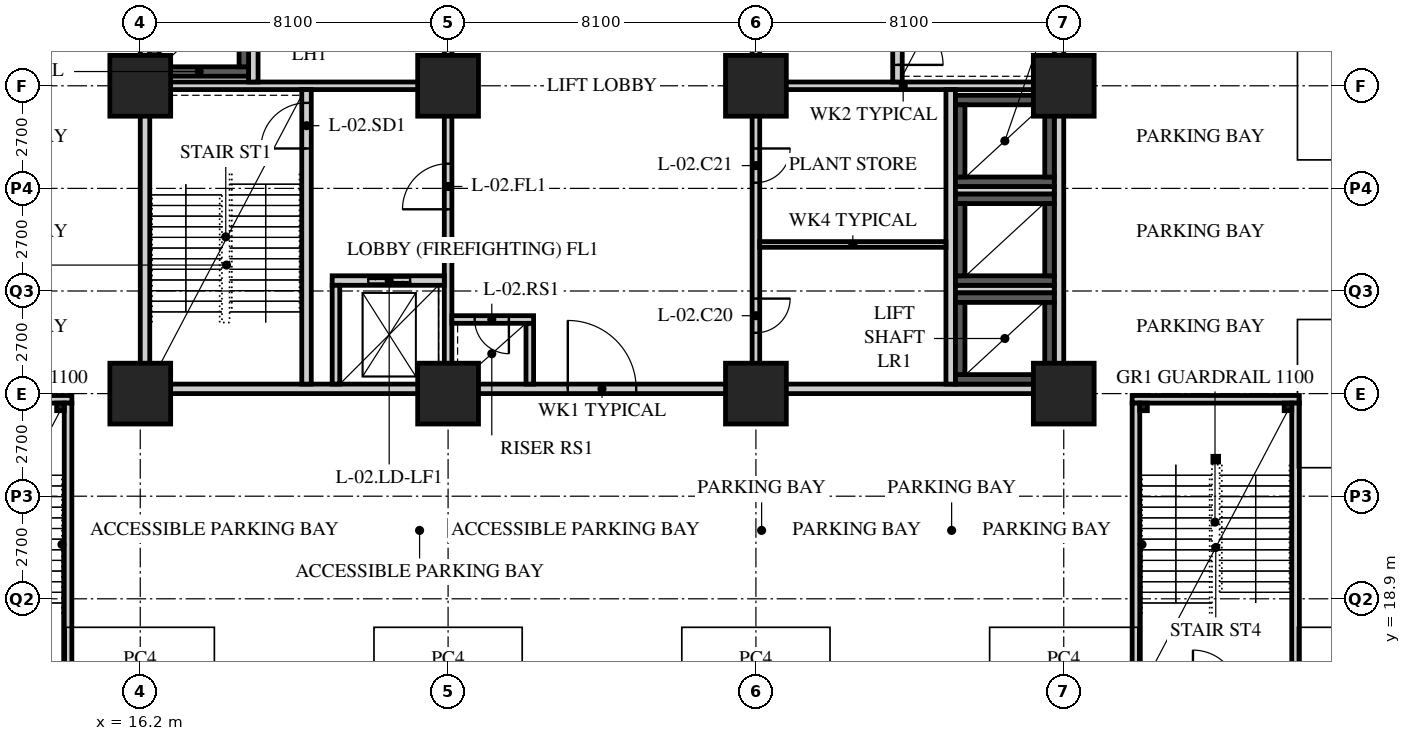
"""IFC4 building model, lengths in metres.
Left out: names, types, materials, properties, quantities, classifications, styles, units other than length and angle.
Written with IfcOpenShell. Run it as: python <this file> out.ifc"""

import sys

from ifc_helpers import new_model, si_unit, direction, frame, frame_2d, origin, origin_2d, place, context, subcontext, project, spatial, rectangle, hollow_rectangle, extrude, element, fill, save


model = new_model("IFC4")
c1 = context("Model", 3, precision=1e-05, world=origin(), true_north=direction((0.0, 1.0)))
c2 = subcontext(c1, "Body", "Model", "MODEL_VIEW")
j1 = project(units=[si_unit("LENGTHUNIT", "METRE"), si_unit("PLANEANGLEUNIT", "RADIAN")], contexts=[c1])
p1 = place(None, origin())
s1 = spatial("IfcSite", under=j1, at=p1, CompositionType="ELEMENT")
p2 = place(p1, origin())
s2 = spatial("IfcBuilding", under=s1, at=p2, CompositionType="ELEMENT")
p3 = place(p2, frame((0.0, 0.0, -8.4)))
s3 = spatial("IfcBuildingStorey", under=s2, at=p3, CompositionType="ELEMENT", Elevation=-8.4)
for number, where, z_axis, x_axis in (
    (1, (16.2, 24.3, 0.0), (0.0, 0.0, 1.0), (1.0, 0.0, 0.0)),
    (2, (16.2, 32.4, 0.0), (0.0, 0.0, 1.0), (1.0, 0.0, 0.0)),
    (3, (24.3, 24.3, 0.0), (0.0, 0.0, 1.0), (1.0, 0.0, 0.0)),
    (4, (24.3, 32.4, 0.0), (0.0, 0.0, 1.0), (1.0, 0.0, 0.0)),
    (5, (32.4, 24.3, 0.0), (0.0, 0.0, 1.0), (1.0, 0.0, 0.0)),
    (6, (32.4, 32.4, 0.0), (0.0, 0.0, 1.0), (1.0, 0.0, 0.0)),
    (7, (40.5, 24.3, 0.0), (0.0, 0.0, 1.0), (1.0, 0.0, 0.0)),
    (8, (40.5, 32.4, 0.0), (0.0, 0.0, 1.0), (1.0, 0.0, 0.0)),
):
    element("IfcColumn", number, at=place(p3, frame(where, z_axis=z_axis, x_axis=x_axis)), inside=s3, PredefinedType="COLUMN", context=c2, shape_type="SweptSolid", body=[
        extrude(hollow_rectangle(XDim=1.6, YDim=1.6, WallThickness=0.15, at=origin_2d()), origin(), (0.0, 0.0, 1.0), 4.2),
    ])
p4 = place(p3, frame((16.2, 24.425, 0.0), z_axis=(0.0, 0.0, 1.0), x_axis=(1.0, 0.0, 0.0)))
e9 = element("IfcWall", 9, at=p4, inside=s3, PredefinedType="SOLIDWALL", context=c2, shape_type="SweptSolid", body=[
    extrude(rectangle(XDim=24.3, YDim=0.25, at=frame_2d((12.15, 0.0))), origin(), (0.0, 0.0, 1.0), 2.95),
])
p5 = place(p4, frame((11.25, 0.0, 0.0)))
e10 = element("IfcOpeningElement", 10, at=p5, cuts=e9, PredefinedType="OPENING", context=c2, shape_type="SweptSolid", body=[
    extrude(rectangle(XDim=1.8, YDim=2.4, at=frame_2d((0.9, 1.2))), frame((0.0, 0.135, 0.0), z_axis=(0.0, -1.0, 0.0), x_axis=(1.0, 0.0, 0.0)), (0.0, 0.0, 1.0), 0.27),
])
for number, where, z_axis, x_axis in (
    (11, (16.325, 24.55, 0.0), (0.0, 0.0, 1.0), (0.0, 1.0, 0.0)),
    (12, (40.375, 24.55, 0.0), (0.0, 0.0, 1.0), (0.0, 1.0, 0.0)),
):
    element("IfcWall", number, at=place(p3, frame(where, z_axis=z_axis, x_axis=x_axis)), inside=s3, PredefinedType="SOLIDWALL", context=c2, shape_type="SweptSolid", body=[
        extrude(rectangle(XDim=15.7, YDim=0.25, at=frame_2d((7.85, 0.0))), origin(), (0.0, 0.0, 1.0), 2.95),
    ])
p6 = place(p3, frame((16.45, 32.4, 0.0), z_axis=(0.0, 0.0, 1.0), x_axis=(1.0, 0.0, 0.0)))
e13 = element("IfcWall", 13, at=p6, inside=s3, PredefinedType="SOLIDWALL", context=c2, shape_type="SweptSolid", body=[
    extrude(rectangle(XDim=7.95, YDim=0.2, at=frame_2d((3.975, 0.0))), origin(), (0.0, 0.0, 1.0), 2.95),
])
p7 = place(p3, frame((24.3, 24.55, 0.0), z_axis=(0.0, 0.0, 1.0), x_axis=(0.0, 1.0, 0.0)))
e14 = element("IfcWall", 14, at=p7, inside=s3, PredefinedType="SOLIDWALL", context=c2, shape_type="SweptSolid", body=[
    extrude(rectangle(XDim=7.75, YDim=0.2, at=frame_2d((3.875, 0.0))), origin(), (0.0, 0.0, 1.0), 2.95),
])
p8 = place(p7, frame((4.6, 0.0, 0.0)))
e15 = element("IfcOpeningElement", 15, at=p8, cuts=e14, PredefinedType="OPENING", context=c2, shape_type="SweptSolid", body=[
    extrude(rectangle(XDim=1.2, YDim=2.1, at=frame_2d((0.6, 1.05))), frame((0.0, 0.11, 0.0), z_axis=(0.0, -1.0, 0.0), x_axis=(1.0, 0.0, 0.0)), (0.0, 0.0, 1.0), 0.22),
])
p9 = place(p3, frame((20.575, 24.55, 0.0), z_axis=(0.0, 0.0, 1.0), x_axis=(0.0, 1.0, 0.0)))
e16 = element("IfcWall", 16, at=p9, inside=s3, PredefinedType="SOLIDWALL", context=c2, shape_type="SweptSolid", body=[
    extrude(rectangle(XDim=7.75, YDim=0.25, at=frame_2d((3.875, 0.0))), origin(), (0.0, 0.0, 1.0), 3.95),
])
p10 = place(p9, frame((6.2, 0.0, 0.0)))
e17 = element("IfcOpeningElement", 17, at=p10, cuts=e16, PredefinedType="OPENING", context=c2, shape_type="SweptSolid", body=[
    extrude(rectangle(XDim=1.2, YDim=2.1, at=frame_2d((0.6, 1.05))), frame((0.0, 0.135, 0.0), z_axis=(0.0, -1.0, 0.0), x_axis=(1.0, 0.0, 0.0)), (0.0, 0.0, 1.0), 0.27),
])
p11 = place(p3, frame((21.25, 27.275, 0.0), z_axis=(0.0, 0.0, 1.0), x_axis=(1.0, 0.0, 0.0)))
e18 = element("IfcWall", 18, at=p11, inside=s3, PredefinedType="SOLIDWALL", context=c2, shape_type="SweptSolid", body=[
    extrude(rectangle(XDim=2.95, YDim=0.25, at=frame_2d((1.475, 0.0))), origin(), (0.0, 0.0, 1.0), 3.95),
])
p12 = place(p11, frame((0.95, 0.0, 0.0)))
e19 = element("IfcOpeningElement", 19, at=p12, cuts=e18, PredefinedType="OPENING", context=c2, shape_type="SweptSolid", body=[
    extrude(rectangle(XDim=1.1, YDim=2.4, at=frame_2d((0.55, 1.2))), frame((0.0, 0.135, 0.0), z_axis=(0.0, -1.0, 0.0), x_axis=(1.0, 0.0, 0.0)), (0.0, 0.0, 1.0), 0.27),
])
p13 = place(p3, frame((21.35, 24.55, 0.0), z_axis=(0.0, 0.0, 1.0), x_axis=(0.0, 1.0, 0.0)))
e20 = element("IfcWall", 20, at=p13, inside=s3, PredefinedType="SOLIDWALL", context=c2, shape_type="SweptSolid", body=[
    extrude(rectangle(XDim=2.6, YDim=0.2, at=frame_2d((1.3, 0.0))), origin(), (0.0, 0.0, 1.0), 3.95),
])
p14 = place(p3, frame((19.175, 32.5, 0.0), z_axis=(0.0, 0.0, 1.0), x_axis=(0.0, 1.0, 0.0)))
e21 = element("IfcWall", 21, at=p14, inside=s3, PredefinedType="SOLIDWALL", context=c2, shape_type="SweptSolid", body=[
    extrude(rectangle(XDim=7.75, YDim=0.25, at=frame_2d((3.875, 0.0))), origin(), (0.0, 0.0, 1.0), 3.95),
])
p15 = place(p3, frame((26.45, 24.55, 0.0), z_axis=(0.0, 0.0, 1.0), x_axis=(0.0, 1.0, 0.0)))
e22 = element("IfcWall", 22, at=p15, inside=s3, PredefinedType="SOLIDWALL", context=c2, shape_type="SweptSolid", body=[
    extrude(rectangle(XDim=1.6, YDim=0.2, at=frame_2d((0.8, 0.0))), origin(), (0.0, 0.0, 1.0), 3.95),
])
p16 = place(p3, frame((24.4, 26.25, 0.0), z_axis=(0.0, 0.0, 1.0), x_axis=(1.0, 0.0, 0.0)))
e23 = element("IfcWall", 23, at=p16, inside=s3, PredefinedType="SOLIDWALL", context=c2, shape_type="SweptSolid", body=[
    extrude(rectangle(XDim=2.15, YDim=0.2, at=frame_2d((1.075, 0.0))), origin(), (0.0, 0.0, 1.0), 3.95),
])
p17 = place(p16, frame((0.6, 0.0, 0.0)))
e24 = element("IfcOpeningElement", 24, at=p17, cuts=e23, PredefinedType="OPENING", context=c2, shape_type="SweptSolid", body=[
    extrude(rectangle(XDim=0.9, YDim=2.1, at=frame_2d((0.45, 1.05))), frame((0.0, 0.11, 0.0), z_axis=(0.0, -1.0, 0.0), x_axis=(1.0, 0.0, 0.0)), (0.0, 0.0, 1.0), 0.22),
])
p18 = place(p3, frame((32.3, 32.4, 0.0), z_axis=(0.0, 0.0, 1.0), x_axis=(1.0, 0.0, 0.0)))
e25 = element("IfcWall", 25, at=p18, inside=s3, PredefinedType="SOLIDWALL", context=c2, shape_type="SweptSolid", body=[
    extrude(rectangle(XDim=7.95, YDim=0.2, at=frame_2d((3.975, 0.0))), origin(), (0.0, 0.0, 1.0), 2.95),
])
p19 = place(p3, frame((32.4, 32.5, 0.0), z_axis=(0.0, 0.0, 1.0), x_axis=(0.0, 1.0, 0.0)))
e26 = element("IfcWall", 26, at=p19, inside=s3, PredefinedType="SOLIDWALL", context=c2, shape_type="SweptSolid", body=[
    extrude(rectangle(XDim=7.75, YDim=0.2, at=frame_2d((3.875, 0.0))), origin(), (0.0, 0.0, 1.0), 2.95),
])
p20 = place(p19, frame((1.9, 0.0, 0.0)))
e27 = element("IfcOpeningElement", 27, at=p20, cuts=e26, PredefinedType="OPENING", context=c2, shape_type="SweptSolid", body=[
    extrude(rectangle(XDim=1.2, YDim=2.1, at=frame_2d((0.6, 1.05))), frame((0.0, 0.11, 0.0), z_axis=(0.0, -1.0, 0.0), x_axis=(1.0, 0.0, 0.0)), (0.0, 0.0, 1.0), 0.22),
])
p21 = place(p3, frame((37.525, 24.55, 0.0), z_axis=(0.0, 0.0, 1.0), x_axis=(0.0, 1.0, 0.0)))
e28 = element("IfcWall", 28, at=p21, inside=s3, PredefinedType="SOLIDWALL", context=c2, shape_type="SweptSolid", body=[
    extrude(rectangle(XDim=7.75, YDim=0.25, at=frame_2d((3.875, 0.0))), origin(), (0.0, 0.0, 1.0), 3.95),
])
for number, where, z_axis, x_axis in (
    (29, (37.65, 27.05, 0.0), (0.0, 0.0, 1.0), (1.0, 0.0, 0.0)),
    (30, (37.65, 29.65, 0.0), (0.0, 0.0, 1.0), (1.0, 0.0, 0.0)),
):
    element("IfcWall", number, at=place(p3, frame(where, z_axis=z_axis, x_axis=x_axis)), inside=s3, PredefinedType="SOLIDWALL", context=c2, shape_type="SweptSolid", body=[
        extrude(rectangle(XDim=2.6, YDim=0.2, at=frame_2d((1.3, 0.0))), origin(), (0.0, 0.0, 1.0), 3.95),
    ])
p22 = place(p3, frame((36.125, 32.5, 0.0), z_axis=(0.0, 0.0, 1.0), x_axis=(0.0, 1.0, 0.0)))
e31 = element("IfcWall", 31, at=p22, inside=s3, PredefinedType="SOLIDWALL", context=c2, shape_type="SweptSolid", body=[
    extrude(rectangle(XDim=7.75, YDim=0.25, at=frame_2d((3.875, 0.0))), origin(), (0.0, 0.0, 1.0), 3.95),
])
p23 = place(p22, frame((0.45, 0.0, 0.0)))
e32 = element("IfcOpeningElement", 32, at=p23, cuts=e31, PredefinedType="OPENING", context=c2, shape_type="SweptSolid", body=[
    extrude(rectangle(XDim=1.2, YDim=2.1, at=frame_2d((0.6, 1.05))), frame((0.0, 0.135, 0.0), z_axis=(0.0, -1.0, 0.0), x_axis=(1.0, 0.0, 0.0)), (0.0, 0.0, 1.0), 0.27),
])
p24 = place(p3, frame((24.3, 32.5, 0.0), z_axis=(0.0, 0.0, 1.0), x_axis=(0.0, 1.0, 0.0)))
e33 = element("IfcWall", 33, at=p24, inside=s3, PredefinedType="PARTITIONING", context=c2, shape_type="SweptSolid", body=[
    extrude(rectangle(XDim=7.75, YDim=0.2, at=frame_2d((3.875, 0.0))), origin(), (0.0, 0.0, 1.0), 2.95),
])
p25 = place(p24, frame((3.425, 0.0, 0.0)))
e34 = element("IfcOpeningElement", 34, at=p25, cuts=e33, PredefinedType="OPENING", context=c2, shape_type="SweptSolid", body=[
    extrude(rectangle(XDim=0.9, YDim=2.1, at=frame_2d((0.45, 1.05))), frame((0.0, 0.11, 0.0), z_axis=(0.0, -1.0, 0.0), x_axis=(1.0, 0.0, 0.0)), (0.0, 0.0, 1.0), 0.22),
])
p26 = place(p3, frame((32.4, 24.55, 0.0), z_axis=(0.0, 0.0, 1.0), x_axis=(0.0, 1.0, 0.0)))
e35 = element("IfcWall", 35, at=p26, inside=s3, PredefinedType="PARTITIONING", context=c2, shape_type="SweptSolid", body=[
    extrude(rectangle(XDim=7.75, YDim=0.2, at=frame_2d((3.875, 0.0))), origin(), (0.0, 0.0, 1.0), 2.95),
])
p27 = place(p26, frame((1.35, 0.0, 0.0)))
e36 = element("IfcOpeningElement", 36, at=p27, cuts=e35, PredefinedType="OPENING", context=c2, shape_type="SweptSolid", body=[
    extrude(rectangle(XDim=0.9, YDim=2.1, at=frame_2d((0.45, 1.05))), frame((0.0, 0.11, 0.0), z_axis=(0.0, -1.0, 0.0), x_axis=(1.0, 0.0, 0.0)), (0.0, 0.0, 1.0), 0.22),
])
p28 = place(p26, frame((5.3, 0.0, 0.0)))
e37 = element("IfcOpeningElement", 37, at=p28, cuts=e35, PredefinedType="OPENING", context=c2, shape_type="SweptSolid", body=[
    extrude(rectangle(XDim=0.9, YDim=2.1, at=frame_2d((0.45, 1.05))), frame((0.0, 0.11, 0.0), z_axis=(0.0, -1.0, 0.0), x_axis=(1.0, 0.0, 0.0)), (0.0, 0.0, 1.0), 0.22),
])
p29 = place(p3, frame((32.5, 28.225, 0.0), z_axis=(0.0, 0.0, 1.0), x_axis=(1.0, 0.0, 0.0)))
e38 = element("IfcWall", 38, at=p29, inside=s3, PredefinedType="PARTITIONING", context=c2, shape_type="SweptSolid", body=[
    extrude(rectangle(XDim=4.9, YDim=0.15, at=frame_2d((2.45, 0.0))), origin(), (0.0, 0.0, 1.0), 3.95),
])
p30 = place(p3, frame((10.0, 24.15, 0.0), z_axis=(0.0, 0.0, 1.0), x_axis=(1.0, 0.0, 0.0)))
e39 = element("IfcWall", 39, at=p30, inside=s3, PredefinedType="SOLIDWALL", context=c2, shape_type="SweptSolid", body=[
    extrude(rectangle(XDim=4.4, YDim=0.2, at=frame_2d((2.2, 0.0))), origin(), (0.0, 0.0, 1.0), 3.338),
])
p31 = place(p3, frame((14.3, 16.45, 0.0), z_axis=(0.0, 0.0, 1.0), x_axis=(0.0, 1.0, 0.0)))
e40 = element("IfcWall", 40, at=p31, inside=s3, PredefinedType="SOLIDWALL", context=c2, shape_type="SweptSolid", body=[
    extrude(rectangle(XDim=7.6, YDim=0.2, at=frame_2d((3.8, 0.0))), origin(), (0.0, 0.0, 1.0), 3.95),
])
p32 = place(p3, frame((42.3, 24.15, 0.0), z_axis=(0.0, 0.0, 1.0), x_axis=(1.0, 0.0, 0.0)))
e41 = element("IfcWall", 41, at=p32, inside=s3, PredefinedType="SOLIDWALL", context=c2, shape_type="SweptSolid", body=[
    extrude(rectangle(XDim=4.4, YDim=0.2, at=frame_2d((2.2, 0.0))), origin(), (0.0, 0.0, 1.0), 3.338),
])
for number, where, z_axis, x_axis in (
    (42, (42.4, 16.45, 0.0), (0.0, 0.0, 1.0), (0.0, 1.0, 0.0)),
    (43, (46.6, 16.45, 0.0), (0.0, 0.0, 1.0), (0.0, 1.0, 0.0)),
):
    element("IfcWall", number, at=place(p3, frame(where, z_axis=z_axis, x_axis=x_axis)), inside=s3, PredefinedType="SOLIDWALL", context=c2, shape_type="SweptSolid", body=[
        extrude(rectangle(XDim=7.6, YDim=0.2, at=frame_2d((3.8, 0.0))), origin(), (0.0, 0.0, 1.0), 3.95),
    ])
for number, where, z_axis, x_axis in (
    (44, (14.1, 23.95, 0.0), (0.0, 0.0, 1.0), (1.0, 0.0, 0.0)),
    (45, (42.6, 23.95, 0.0), (0.0, 0.0, 1.0), (1.0, 0.0, 0.0)),
    (46, (46.4, 23.95, 0.0), (0.0, 0.0, 1.0), (1.0, 0.0, 0.0)),
):
    element("IfcColumn", number, at=place(p3, frame(where, z_axis=z_axis, x_axis=x_axis)), inside=s3, PredefinedType="COLUMN", context=c2, shape_type="SweptSolid", body=[
        extrude(hollow_rectangle(XDim=0.2, YDim=0.2, WallThickness=0.012, at=origin_2d()), origin(), (0.0, 0.0, 1.0), 4.2),
    ])
p33 = place(p3, frame((44.5, 22.575, 0.0), z_axis=(0.0, 0.0, 1.0), x_axis=(1.0, 0.0, 0.0)))
e47 = element("IfcColumn", 47, at=p33, inside=s3, PredefinedType="COLUMN", context=c2, shape_type="SweptSolid", body=[
    extrude(hollow_rectangle(XDim=0.15, YDim=0.15, WallThickness=0.01, at=origin_2d()), origin(), (0.0, 0.0, 1.0), 4.2),
])
p34 = place(p3, frame((16.45, 32.775, -0.4), z_axis=(0.0, 0.0, 1.0), x_axis=(1.0, 0.0, 0.0)))
e48 = element("IfcWall", 48, at=p34, inside=s3, PredefinedType="SOLIDWALL", context=c2, shape_type="SweptSolid", body=[
    extrude(rectangle(XDim=2.6, YDim=0.25, at=frame_2d((1.3, 0.0))), origin(), (0.0, 0.0, 1.0), 4.6),
])
for number, where, z_axis, x_axis in (
    (49, (16.575, 32.9, -0.4), (0.0, 0.0, 1.0), (0.0, 1.0, 0.0)),
    (50, (18.925, 32.9, -0.4), (0.0, 0.0, 1.0), (0.0, 1.0, 0.0)),
):
    element("IfcWall", number, at=place(p3, frame(where, z_axis=z_axis, x_axis=x_axis)), inside=s3, PredefinedType="SOLIDWALL", context=c2, shape_type="SweptSolid", body=[
        extrude(rectangle(XDim=1.9, YDim=0.25, at=frame_2d((0.95, 0.0))), origin(), (0.0, 0.0, 1.0), 4.6),
    ])
for number, where, z_axis, x_axis in (
    (51, (37.65, 24.675, -0.4), (0.0, 0.0, 1.0), (1.0, 0.0, 0.0)),
    (52, (37.65, 26.825, -0.4), (0.0, 0.0, 1.0), (1.0, 0.0, 0.0)),
):
    element("IfcWall", number, at=place(p3, frame(where, z_axis=z_axis, x_axis=x_axis)), inside=s3, PredefinedType="SOLIDWALL", context=c2, shape_type="SweptSolid", body=[
        extrude(rectangle(XDim=2.6, YDim=0.25, at=frame_2d((1.3, 0.0))), origin(), (0.0, 0.0, 1.0), 4.6),
    ])
for number, where, z_axis, x_axis in (
    (53, (37.775, 24.8, -0.4), (0.0, 0.0, 1.0), (0.0, 1.0, 0.0)),
    (54, (40.125, 24.8, -0.4), (0.0, 0.0, 1.0), (0.0, 1.0, 0.0)),
):
    element("IfcWall", number, at=place(p3, frame(where, z_axis=z_axis, x_axis=x_axis)), inside=s3, PredefinedType="SOLIDWALL", context=c2, shape_type="SweptSolid", body=[
        extrude(rectangle(XDim=1.9, YDim=0.25, at=frame_2d((0.95, 0.0))), origin(), (0.0, 0.0, 1.0), 4.6),
    ])
for number, where, z_axis, x_axis in (
    (55, (37.65, 27.275, -0.4), (0.0, 0.0, 1.0), (1.0, 0.0, 0.0)),
    (56, (37.65, 29.425, -0.4), (0.0, 0.0, 1.0), (1.0, 0.0, 0.0)),
):
    element("IfcWall", number, at=place(p3, frame(where, z_axis=z_axis, x_axis=x_axis)), inside=s3, PredefinedType="SOLIDWALL", context=c2, shape_type="SweptSolid", body=[
        extrude(rectangle(XDim=2.6, YDim=0.25, at=frame_2d((1.3, 0.0))), origin(), (0.0, 0.0, 1.0), 4.6),
    ])
for number, where, z_axis, x_axis in (
    (57, (37.775, 27.4, -0.4), (0.0, 0.0, 1.0), (0.0, 1.0, 0.0)),
    (58, (40.125, 27.4, -0.4), (0.0, 0.0, 1.0), (0.0, 1.0, 0.0)),
):
    element("IfcWall", number, at=place(p3, frame(where, z_axis=z_axis, x_axis=x_axis)), inside=s3, PredefinedType="SOLIDWALL", context=c2, shape_type="SweptSolid", body=[
        extrude(rectangle(XDim=1.9, YDim=0.25, at=frame_2d((0.95, 0.0))), origin(), (0.0, 0.0, 1.0), 4.6),
    ])
for number, where, z_axis, x_axis in (
    (59, (37.65, 29.875, -0.4), (0.0, 0.0, 1.0), (1.0, 0.0, 0.0)),
    (60, (37.65, 32.025, -0.4), (0.0, 0.0, 1.0), (1.0, 0.0, 0.0)),
):
    element("IfcWall", number, at=place(p3, frame(where, z_axis=z_axis, x_axis=x_axis)), inside=s3, PredefinedType="SOLIDWALL", context=c2, shape_type="SweptSolid", body=[
        extrude(rectangle(XDim=2.6, YDim=0.25, at=frame_2d((1.3, 0.0))), origin(), (0.0, 0.0, 1.0), 4.6),
    ])
for number, where, z_axis, x_axis in (
    (61, (37.775, 30.0, -0.4), (0.0, 0.0, 1.0), (0.0, 1.0, 0.0)),
    (62, (40.125, 30.0, -0.4), (0.0, 0.0, 1.0), (0.0, 1.0, 0.0)),
):
    element("IfcWall", number, at=place(p3, frame(where, z_axis=z_axis, x_axis=x_axis)), inside=s3, PredefinedType="SOLIDWALL", context=c2, shape_type="SweptSolid", body=[
        extrude(rectangle(XDim=1.9, YDim=0.25, at=frame_2d((0.95, 0.0))), origin(), (0.0, 0.0, 1.0), 4.6),
    ])
p35 = place(p27, origin())
e63 = element("IfcDoor", 63, at=p35, inside=s3, OperationType="SINGLE_SWING_LEFT", PredefinedType="DOOR", context=c2, shape_type="SweptSolid", body=[
    extrude(rectangle(XDim=0.9, YDim=2.1, at=frame_2d((0.45, 1.05))), frame((0.0, 0.025, 0.0), z_axis=(0.0, -1.0, 0.0), x_axis=(1.0, 0.0, 0.0)), (0.0, 0.0, 1.0), 0.05),
])
fill(e36, e63)
p36 = place(p28, origin())
e64 = element("IfcDoor", 64, at=p36, inside=s3, OperationType="SINGLE_SWING_LEFT", PredefinedType="DOOR", context=c2, shape_type="SweptSolid", body=[
    extrude(rectangle(XDim=0.9, YDim=2.1, at=frame_2d((0.45, 1.05))), frame((0.0, 0.025, 0.0), z_axis=(0.0, -1.0, 0.0), x_axis=(1.0, 0.0, 0.0)), (0.0, 0.0, 1.0), 0.05),
])
fill(e37, e64)
p37 = place(p10, origin())
e65 = element("IfcDoor", 65, at=p37, inside=s3, OperationType="SINGLE_SWING_LEFT", PredefinedType="DOOR", context=c2, shape_type="SweptSolid", body=[
    extrude(rectangle(XDim=1.2, YDim=2.1, at=frame_2d((0.6, 1.05))), frame((0.0, 0.025, 0.0), z_axis=(0.0, -1.0, 0.0), x_axis=(1.0, 0.0, 0.0)), (0.0, 0.0, 1.0), 0.05),
])
fill(e17, e65)
p38 = place(p8, origin())
e66 = element("IfcDoor", 66, at=p38, inside=s3, OperationType="SINGLE_SWING_LEFT", PredefinedType="DOOR", context=c2, shape_type="SweptSolid", body=[
    extrude(rectangle(XDim=1.2, YDim=2.1, at=frame_2d((0.6, 1.05))), frame((0.0, 0.025, 0.0), z_axis=(0.0, -1.0, 0.0), x_axis=(1.0, 0.0, 0.0)), (0.0, 0.0, 1.0), 0.05),
])
fill(e15, e66)
p39 = place(p17, origin())
e67 = element("IfcDoor", 67, at=p39, inside=s3, OperationType="SINGLE_SWING_LEFT", PredefinedType="DOOR", context=c2, shape_type="SweptSolid", body=[
    extrude(rectangle(XDim=0.9, YDim=2.1, at=frame_2d((0.45, 1.05))), frame((0.0, 0.025, 0.0), z_axis=(0.0, -1.0, 0.0), x_axis=(1.0, 0.0, 0.0)), (0.0, 0.0, 1.0), 0.05),
])
fill(e24, e67)
p40 = place(p23, origin())
e68 = element("IfcDoor", 68, at=p40, inside=s3, OperationType="SINGLE_SWING_RIGHT", PredefinedType="DOOR", context=c2, shape_type="SweptSolid", body=[
    extrude(rectangle(XDim=1.2, YDim=2.1, at=frame_2d((0.6, 1.05))), frame((0.0, 0.025, 0.0), z_axis=(0.0, -1.0, 0.0), x_axis=(1.0, 0.0, 0.0)), (0.0, 0.0, 1.0), 0.05),
])
fill(e32, e68)
p41 = place(p12, origin())
e69 = element("IfcDoor", 69, at=p41, inside=s3, OperationType="DOUBLE_DOOR_SLIDING", PredefinedType="DOOR", context=c2, shape_type="SweptSolid", body=[
    extrude(rectangle(XDim=1.1, YDim=2.4, at=frame_2d((0.55, 1.2))), frame((0.0, 0.025, 0.0), z_axis=(0.0, -1.0, 0.0), x_axis=(1.0, 0.0, 0.0)), (0.0, 0.0, 1.0), 0.05),
])
fill(e19, e69)
p42 = place(p5, origin())
e70 = element("IfcDoor", 70, at=p42, inside=s3, OperationType="DOUBLE_DOOR_SINGLE_SWING", PredefinedType="DOOR", context=c2, shape_type="SweptSolid", body=[
    extrude(rectangle(XDim=1.8, YDim=2.4, at=frame_2d((0.9, 1.2))), frame((0.0, 0.025, 0.0), z_axis=(0.0, -1.0, 0.0), x_axis=(1.0, 0.0, 0.0)), (0.0, 0.0, 1.0), 0.05),
])
fill(e10, e70)
save(model, sys.argv[1])
